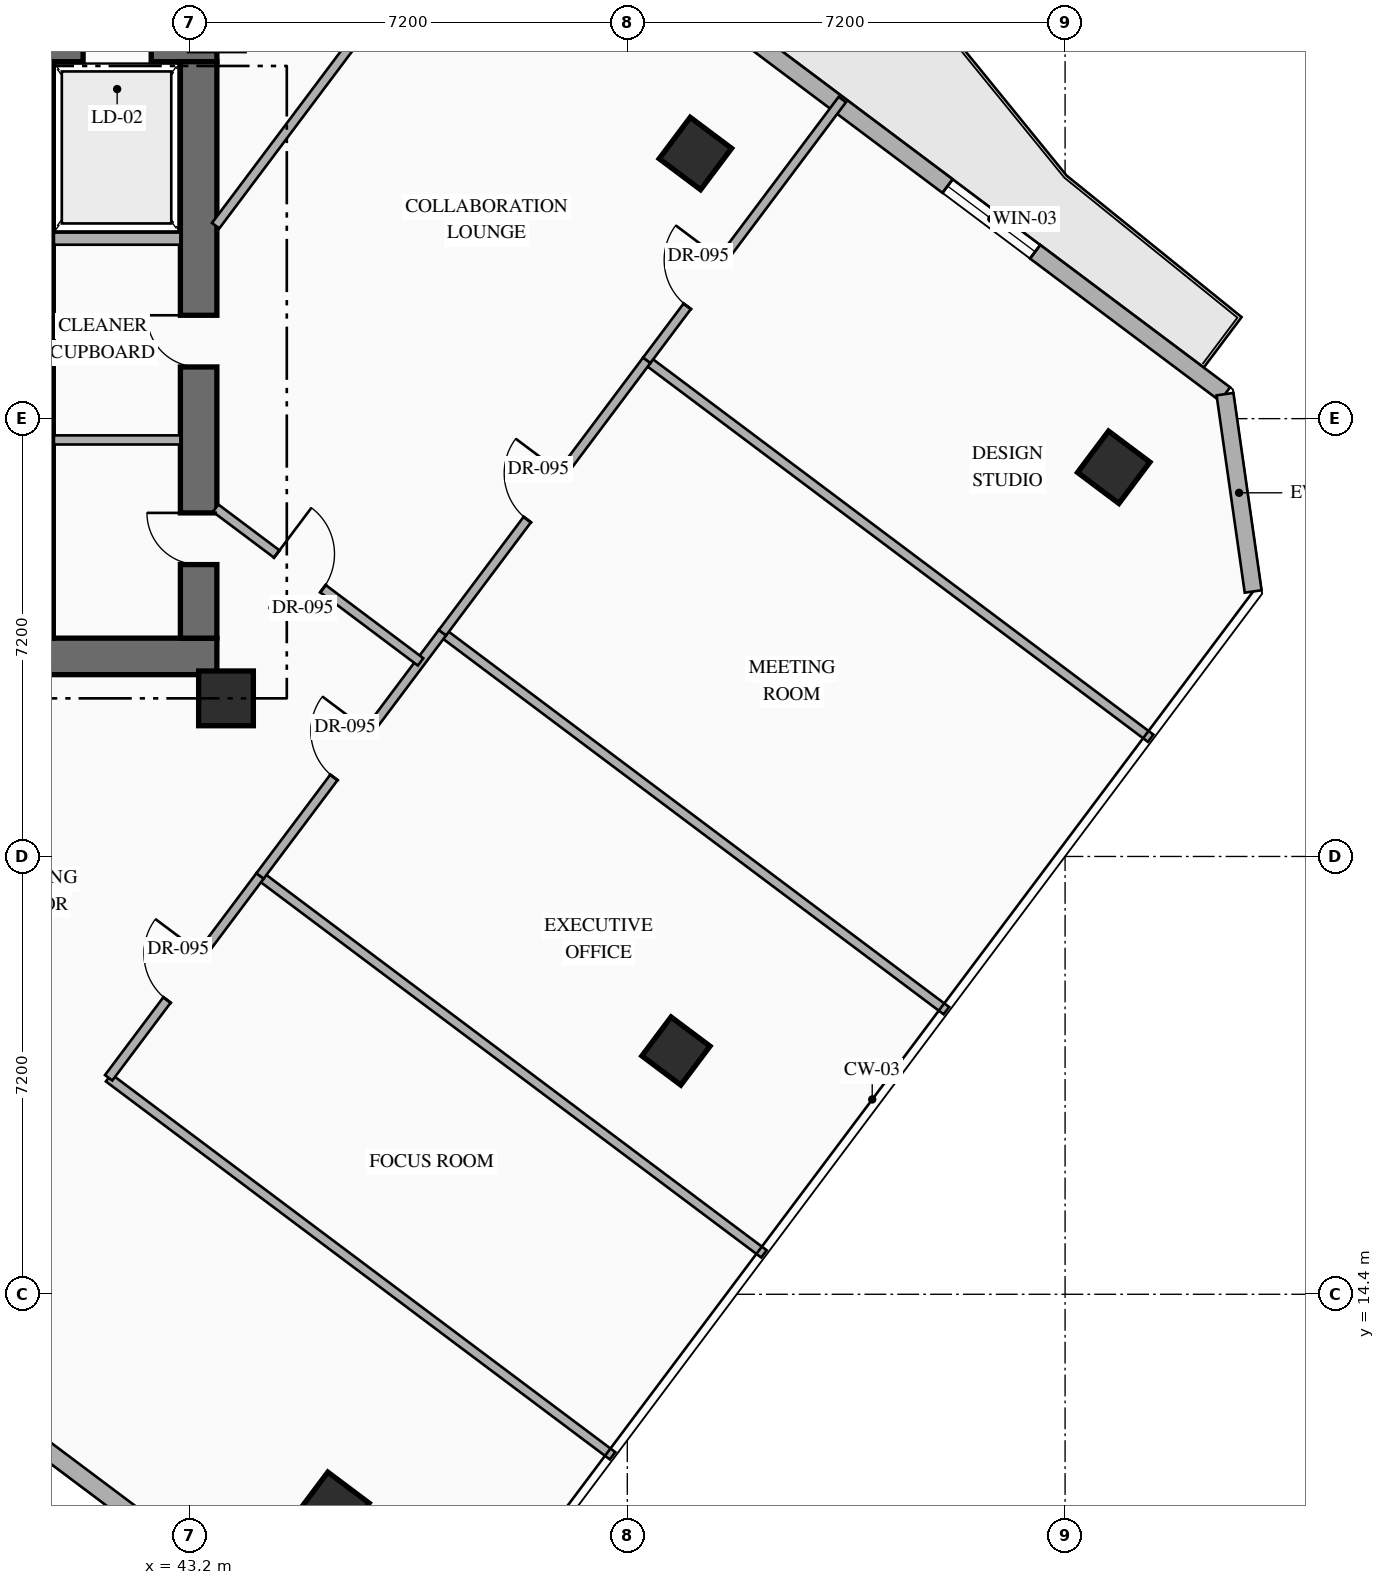
"""IFC4 building model, lengths in metres.
Left out: names, types, materials, properties, quantities, classifications, styles, units other than length and angle.
Written with IfcOpenShell. Run it as: python <this file> out.ifc"""

import sys

from ifc_helpers import new_model, si_unit, direction, frame, frame_2d, origin, origin_2d, place, context, subcontext, project, spatial, rectangle, hollow_rectangle, extrude, element, fill, save


model = new_model("IFC4")
c1 = context("Model", 3, precision=1e-05, world=origin(), true_north=direction((0.0, 1.0)))
c2 = subcontext(c1, "Body", "Model", "MODEL_VIEW")
j1 = project(units=[si_unit("LENGTHUNIT", "METRE"), si_unit("PLANEANGLEUNIT", "RADIAN")], contexts=[c1])
p1 = place(None, origin())
s1 = spatial("IfcSite", under=j1, at=p1, CompositionType="ELEMENT")
p2 = place(p1, origin())
s2 = spatial("IfcBuilding", under=s1, at=p2, CompositionType="ELEMENT")
p3 = place(p2, frame((0.0, 0.0, 145.65)))
s3 = spatial("IfcBuildingStorey", under=s2, at=p3, CompositionType="ELEMENT", Elevation=145.65)
p4 = place(p3, frame((35.89, 24.89, 0.0), z_axis=(0.0, 0.0, 1.0), x_axis=(1.0, 0.0, 0.0)))
e1 = element("IfcWall", 1, at=p4, inside=s3, PredefinedType="SHEAR", context=c2, shape_type="SweptSolid", body=[
    extrude(rectangle(XDim=7.76, YDim=0.6, at=frame_2d((3.88, 0.0))), origin(), (0.0, 0.0, 1.0), 3.6),
])
p5 = place(p3, frame((35.89, 34.97, 0.0), z_axis=(0.0, 0.0, 1.0), x_axis=(1.0, 0.0, 0.0)))
e2 = element("IfcWall", 2, at=p5, inside=s3, PredefinedType="SHEAR", context=c2, shape_type="SweptSolid", body=[
    extrude(rectangle(XDim=7.76, YDim=0.6, at=frame_2d((3.88, 0.0))), origin(), (0.0, 0.0, 1.0), 3.6),
])
p6 = place(p5, frame((2.66, 0.0, 0.0)))
e3 = element("IfcOpeningElement", 3, at=p6, cuts=e2, PredefinedType="OPENING", context=c2, shape_type="SweptSolid", body=[
    extrude(rectangle(XDim=1.1, YDim=2.2, at=frame_2d((0.55, 1.1))), frame((0.0, 0.31, 0.0), z_axis=(0.0, -1.0, 0.0), x_axis=(1.0, 0.0, 0.0)), (0.0, 0.0, 1.0), 0.62),
])
p7 = place(p5, frame((5.56, 0.0, 0.0)))
e4 = element("IfcOpeningElement", 4, at=p7, cuts=e2, PredefinedType="OPENING", context=c2, shape_type="SweptSolid", body=[
    extrude(rectangle(XDim=1.12, YDim=2.15, at=frame_2d((0.56, 1.075))), frame((0.0, 0.31, 0.0), z_axis=(0.0, -1.0, 0.0), x_axis=(1.0, 0.0, 0.0)), (0.0, 0.0, 1.0), 0.62),
])
p8 = place(p3, frame((43.35, 25.19, 0.0), z_axis=(0.0, 0.0, 1.0), x_axis=(0.0, 1.0, 0.0)))
e5 = element("IfcWall", 5, at=p8, inside=s3, PredefinedType="SHEAR", context=c2, shape_type="SweptSolid", body=[
    extrude(rectangle(XDim=9.48, YDim=0.6, at=frame_2d((4.74, 0.0))), origin(), (0.0, 0.0, 1.0), 3.6),
])
p9 = place(p8, frame((1.21, 0.0, 0.0)))
e6 = element("IfcOpeningElement", 6, at=p9, cuts=e5, PredefinedType="OPENING", context=c2, shape_type="SweptSolid", body=[
    extrude(rectangle(XDim=0.85, YDim=2.08, at=frame_2d((0.425, 1.04))), frame((0.0, 0.31, 0.0), z_axis=(0.0, -1.0, 0.0), x_axis=(1.0, 0.0, 0.0)), (0.0, 0.0, 1.0), 0.62),
])
p10 = place(p8, frame((4.46, 0.0, 0.0)))
e7 = element("IfcOpeningElement", 7, at=p10, cuts=e5, PredefinedType="OPENING", context=c2, shape_type="SweptSolid", body=[
    extrude(rectangle(XDim=0.85, YDim=2.08, at=frame_2d((0.425, 1.04))), frame((0.0, 0.31, 0.0), z_axis=(0.0, -1.0, 0.0), x_axis=(1.0, 0.0, 0.0)), (0.0, 0.0, 1.0), 0.62),
])
p11 = place(p3, frame((40.81, 25.19, 0.0), z_axis=(0.0, 0.0, 1.0), x_axis=(0.0, 1.0, 0.0)))
e8 = element("IfcWall", 8, at=p11, inside=s3, PredefinedType="SHEAR", context=c2, shape_type="SweptSolid", body=[
    extrude(rectangle(XDim=9.48, YDim=0.3, at=frame_2d((4.74, 0.0))), origin(), (0.0, 0.0, 1.0), 3.6),
])
p12 = place(p3, frame((43.8, 24.2, 0.0), z_axis=(0.0, 0.0, 1.0), x_axis=(1.0, 0.0, 0.0)))
e9 = element("IfcColumn", 9, at=p12, inside=s3, PredefinedType="COLUMN", context=c2, shape_type="SweptSolid", body=[
    extrude(rectangle(XDim=0.9, YDim=0.9, at=origin_2d()), origin(), (0.0, 0.0, 1.0), 3.6),
])
for number, where, z_axis, x_axis in (
    (10, (51.52, 33.16, 0.0), (0.0, 0.0, 1.0), (0.8, -0.6, 0.0)),
    (11, (45.56, 10.88, 0.0), (0.0, 0.0, 1.0), (0.8, -0.6, 0.0)),
    (12, (58.4, 28.0, 0.0), (0.0, 0.0, 1.0), (0.8, -0.6, 0.0)),
):
    element("IfcColumn", number, at=place(p3, frame(where, z_axis=z_axis, x_axis=x_axis)), inside=s3, PredefinedType="COLUMN", context=c2, shape_type="SweptSolid", body=[
        extrude(hollow_rectangle(XDim=0.85, YDim=0.85, WallThickness=0.032, at=origin_2d()), origin(), (0.0, 0.0, 1.0), 3.6),
    ])
p13 = place(p3, frame((51.2, 18.4, 0.0), z_axis=(0.0, 0.0, 1.0), x_axis=(0.799999996291, -0.600000004945, 0.0)))
e13 = element("IfcColumn", 13, at=p13, inside=s3, PredefinedType="COLUMN", context=c2, shape_type="SweptSolid", body=[
    extrude(hollow_rectangle(XDim=0.8, YDim=0.8, WallThickness=0.032, at=origin_2d()), origin(), (0.0, 0.0, 1.0), 3.6),
])
p14 = place(p3, frame((44.86, 40.73, 0.0), z_axis=(0.0, 0.0, 1.0), x_axis=(0.800007624502, -0.599989833863, 0.0)))
e14 = element("IfcWall", 14, at=p14, inside=s3, PredefinedType="STANDARD", context=c2, shape_type="SweptSolid", body=[
    extrude(rectangle(XDim=19.212, YDim=0.28, at=frame_2d((9.606, 0.0))), origin(), (0.0, 0.0, 1.0), 3.35),
])
p15 = place(p14, frame((1.755, 0.0, 0.0)))
e15 = element("IfcOpeningElement", 15, at=p15, cuts=e14, PredefinedType="OPENING", context=c2, shape_type="SweptSolid", body=[
    extrude(rectangle(XDim=1.1, YDim=2.2, at=frame_2d((0.55, 1.1))), frame((0.0, 0.15, 0.0), z_axis=(0.0, -1.0, 0.0), x_axis=(1.0, 0.0, 0.0)), (0.0, 0.0, 1.0), 0.3),
])
p16 = place(p14, frame((13.509, 0.0, 0.85)))
e16 = element("IfcOpeningElement", 16, at=p16, cuts=e14, PredefinedType="OPENING", context=c2, shape_type="SweptSolid", body=[
    extrude(rectangle(XDim=1.8, YDim=2.1, at=frame_2d((0.9, 1.05))), frame((0.0, 0.15, 0.0), z_axis=(0.0, -1.0, 0.0), x_axis=(1.0, 0.0, 0.0)), (0.0, 0.0, 1.0), 0.3),
])
p17 = place(p3, frame((60.23, 29.203, 0.0), z_axis=(0.0, 0.0, 1.0), x_axis=(0.141296221922, -0.989967361922, 0.0)))
e17 = element("IfcWall", 17, at=p17, inside=s3, PredefinedType="STANDARD", context=c2, shape_type="SweptSolid", body=[
    extrude(rectangle(XDim=3.278, YDim=0.28, at=frame_2d((1.639, 0.0))), origin(), (0.0, 0.0, 1.0), 3.35),
])
p18 = place(p3, frame((44.918, 8.787, 0.0), z_axis=(0.0, 0.0, 1.0), x_axis=(-0.800004765927, 0.599993645378, 0.0)))
e18 = element("IfcWall", 18, at=p18, inside=s3, PredefinedType="STANDARD", context=c2, shape_type="SweptSolid", body=[
    extrude(rectangle(XDim=24.588, YDim=0.28, at=frame_2d((12.294, 0.0))), origin(), (0.0, 0.0, 1.0), 3.35),
])
p19 = place(p3, frame((40.97, 31.76, 0.0), z_axis=(0.0, 0.0, 1.0), x_axis=(1.0, 0.0, 0.0)))
e19 = element("IfcWall", 19, at=p19, inside=s3, PredefinedType="STANDARD", context=c2, shape_type="SweptSolid", body=[
    extrude(rectangle(XDim=2.08, YDim=0.2, at=frame_2d((1.04, 0.0))), origin(), (0.0, 0.0, 1.0), 3.35),
])
p20 = place(p3, frame((40.97, 28.45, 0.0), z_axis=(0.0, 0.0, 1.0), x_axis=(1.0, 0.0, 0.0)))
e20 = element("IfcWall", 20, at=p20, inside=s3, PredefinedType="PARTITIONING", context=c2, shape_type="SweptSolid", body=[
    extrude(rectangle(XDim=2.08, YDim=0.15, at=frame_2d((1.04, 0.0))), origin(), (0.0, 0.0, 1.0), 3.35),
])
for number, where, z_axis, x_axis in (
    (21, (41.87, 17.96, 0.0), (0.0, 0.0, 1.0), (0.8, -0.6, 0.0)),
    (22, (44.36, 21.28, 0.0), (0.0, 0.0, 1.0), (0.8, -0.6, 0.0)),
):
    element("IfcWall", number, at=place(p3, frame(where, z_axis=z_axis, x_axis=x_axis)), inside=s3, PredefinedType="PARTITIONING", context=c2, shape_type="SweptSolid", body=[
        extrude(rectangle(XDim=10.36, YDim=0.15, at=frame_2d((5.18, 0.0))), origin(), (0.0, 0.0, 1.0), 3.35),
    ])
p21 = place(p3, frame((41.87, 17.96, 0.0), z_axis=(0.0, 0.0, 1.0), x_axis=(0.599990587419, 0.80000705935, 0.0)))
e23 = element("IfcWall", 23, at=p21, inside=s3, PredefinedType="PARTITIONING", context=c2, shape_type="SweptSolid", body=[
    extrude(rectangle(XDim=4.15, YDim=0.15, at=frame_2d((2.075, 0.0))), origin(), (0.0, 0.0, 1.0), 3.35),
])
p22 = place(p21, frame((1.6, 0.0, 0.0)))
e24 = element("IfcOpeningElement", 24, at=p22, cuts=e23, PredefinedType="OPENING", context=c2, shape_type="SweptSolid", body=[
    extrude(rectangle(XDim=0.95, YDim=2.15, at=frame_2d((0.475, 1.075))), frame((0.0, 0.085, 0.0), z_axis=(0.0, -1.0, 0.0), x_axis=(1.0, 0.0, 0.0)), (0.0, 0.0, 1.0), 0.17),
])
p23 = place(p3, frame((47.36, 25.28, 0.0), z_axis=(0.0, 0.0, 1.0), x_axis=(0.799991516197, -0.600011311571, 0.0)))
e25 = element("IfcWall", 25, at=p23, inside=s3, PredefinedType="PARTITIONING", context=c2, shape_type="SweptSolid", body=[
    extrude(rectangle(XDim=10.36, YDim=0.15, at=frame_2d((5.18, 0.0))), origin(), (0.0, 0.0, 1.0), 3.35),
])
p24 = place(p3, frame((44.36, 21.28, 0.0), z_axis=(0.0, 0.0, 1.0), x_axis=(0.6, 0.8, 0.0)))
e26 = element("IfcWall", 26, at=p24, inside=s3, PredefinedType="PARTITIONING", context=c2, shape_type="SweptSolid", body=[
    extrude(rectangle(XDim=5.0, YDim=0.15, at=frame_2d((2.5, 0.0))), origin(), (0.0, 0.0, 1.0), 3.35),
])
p25 = place(p24, frame((2.025, 0.0, 0.0)))
e27 = element("IfcOpeningElement", 27, at=p25, cuts=e26, PredefinedType="OPENING", context=c2, shape_type="SweptSolid", body=[
    extrude(rectangle(XDim=0.95, YDim=2.15, at=frame_2d((0.475, 1.075))), frame((0.0, 0.085, 0.0), z_axis=(0.0, -1.0, 0.0), x_axis=(1.0, 0.0, 0.0)), (0.0, 0.0, 1.0), 0.17),
])
p26 = place(p3, frame((50.72, 29.76, 0.0), z_axis=(0.0, 0.0, 1.0), x_axis=(0.8, -0.6, 0.0)))
e28 = element("IfcWall", 28, at=p26, inside=s3, PredefinedType="PARTITIONING", context=c2, shape_type="SweptSolid", body=[
    extrude(rectangle(XDim=10.36, YDim=0.15, at=frame_2d((5.18, 0.0))), origin(), (0.0, 0.0, 1.0), 3.35),
])
p27 = place(p3, frame((47.36, 25.28, 0.0), z_axis=(0.0, 0.0, 1.0), x_axis=(0.599986048773, 0.80001046323, 0.0)))
e29 = element("IfcWall", 29, at=p27, inside=s3, PredefinedType="PARTITIONING", context=c2, shape_type="SweptSolid", body=[
    extrude(rectangle(XDim=5.6, YDim=0.15, at=frame_2d((2.8, 0.0))), origin(), (0.0, 0.0, 1.0), 3.35),
])
p28 = place(p27, frame((2.325, 0.0, 0.0)))
e30 = element("IfcOpeningElement", 30, at=p28, cuts=e29, PredefinedType="OPENING", context=c2, shape_type="SweptSolid", body=[
    extrude(rectangle(XDim=0.95, YDim=2.15, at=frame_2d((0.475, 1.075))), frame((0.0, 0.085, 0.0), z_axis=(0.0, -1.0, 0.0), x_axis=(1.0, 0.0, 0.0)), (0.0, 0.0, 1.0), 0.17),
])
p29 = place(p3, frame((50.72, 29.76, 0.0), z_axis=(0.0, 0.0, 1.0), x_axis=(0.6, 0.8, 0.0)))
e31 = element("IfcWall", 31, at=p29, inside=s3, PredefinedType="PARTITIONING", context=c2, shape_type="SweptSolid", body=[
    extrude(rectangle(XDim=5.36, YDim=0.15, at=frame_2d((2.68, 0.0))), origin(), (0.0, 0.0, 1.0), 3.35),
])
p30 = place(p29, frame((1.11, 0.0, 0.0)))
e32 = element("IfcOpeningElement", 32, at=p30, cuts=e31, PredefinedType="OPENING", context=c2, shape_type="SweptSolid", body=[
    extrude(rectangle(XDim=0.95, YDim=2.15, at=frame_2d((0.475, 1.075))), frame((0.0, 0.085, 0.0), z_axis=(0.0, -1.0, 0.0), x_axis=(1.0, 0.0, 0.0)), (0.0, 0.0, 1.0), 0.17),
])
p31 = place(p3, frame((43.63, 27.328, 0.0), z_axis=(0.0, 0.0, 1.0), x_axis=(0.799972182084, -0.600037088764, 0.0)))
e33 = element("IfcWall", 33, at=p31, inside=s3, PredefinedType="PARTITIONING", context=c2, shape_type="SweptSolid", body=[
    extrude(rectangle(XDim=4.213, YDim=0.15, at=frame_2d((2.106, 0.0))), origin(), (0.0, 0.0, 1.0), 3.045),
])
p32 = place(p31, frame((1.256, 0.0, 0.0)))
e34 = element("IfcOpeningElement", 34, at=p32, cuts=e33, PredefinedType="OPENING", context=c2, shape_type="SweptSolid", body=[
    extrude(rectangle(XDim=0.95, YDim=2.15, at=frame_2d((0.475, 1.075))), frame((0.0, 0.085, 0.0), z_axis=(0.0, -1.0, 0.0), x_axis=(1.0, 0.0, 0.0)), (0.0, 0.0, 1.0), 0.17),
])
p33 = place(p3, frame((43.63, 31.973, 0.0), z_axis=(0.0, 0.0, 1.0), x_axis=(0.599975099311, 0.800018674911, 0.0)))
e35 = element("IfcWall", 35, at=p33, inside=s3, PredefinedType="PARTITIONING", context=c2, shape_type="SweptSolid", body=[
    extrude(rectangle(XDim=7.844, YDim=0.15, at=frame_2d((3.922, 0.0))), origin(), (0.0, 0.0, 1.0), 3.35),
])
p34 = place(p16, origin())
e36 = element("IfcWindow", 36, at=p34, inside=s3, PartitioningType="SINGLE_PANEL", PredefinedType="WINDOW", context=c2, shape_type="SweptSolid", body=[
    extrude(rectangle(XDim=1.8, YDim=2.1, at=frame_2d((0.9, 1.05))), frame((0.0, 0.03, 0.0), z_axis=(0.0, -1.0, 0.0), x_axis=(1.0, 0.0, 0.0)), (0.0, 0.0, 1.0), 0.06),
])
fill(e16, e36)
p35 = place(p9, origin())
e37 = element("IfcDoor", 37, at=p35, inside=s3, OperationType="SINGLE_SWING_RIGHT", PredefinedType="DOOR", context=c2, shape_type="SweptSolid", body=[
    extrude(rectangle(XDim=0.85, YDim=2.08, at=frame_2d((0.425, 1.04))), frame((0.0, 0.025, 0.0), z_axis=(0.0, -1.0, 0.0), x_axis=(1.0, 0.0, 0.0)), (0.0, 0.0, 1.0), 0.05),
])
fill(e6, e37)
p36 = place(p10, origin())
e38 = element("IfcDoor", 38, at=p36, inside=s3, OperationType="SINGLE_SWING_RIGHT", PredefinedType="DOOR", context=c2, shape_type="SweptSolid", body=[
    extrude(rectangle(XDim=0.85, YDim=2.08, at=frame_2d((0.425, 1.04))), frame((0.0, 0.025, 0.0), z_axis=(0.0, -1.0, 0.0), x_axis=(1.0, 0.0, 0.0)), (0.0, 0.0, 1.0), 0.05),
])
fill(e7, e38)
p37 = place(p22, origin())
e39 = element("IfcDoor", 39, at=p37, inside=s3, OperationType="SINGLE_SWING_RIGHT", PredefinedType="DOOR", context=c2, shape_type="SweptSolid", body=[
    extrude(rectangle(XDim=0.95, YDim=2.15, at=frame_2d((0.475, 1.075))), frame((0.0, 0.025, 0.0), z_axis=(0.0, -1.0, 0.0), x_axis=(1.0, 0.0, 0.0)), (0.0, 0.0, 1.0), 0.05),
])
fill(e24, e39)
p38 = place(p25, origin())
e40 = element("IfcDoor", 40, at=p38, inside=s3, OperationType="SINGLE_SWING_RIGHT", PredefinedType="DOOR", context=c2, shape_type="SweptSolid", body=[
    extrude(rectangle(XDim=0.95, YDim=2.15, at=frame_2d((0.475, 1.075))), frame((0.0, 0.025, 0.0), z_axis=(0.0, -1.0, 0.0), x_axis=(1.0, 0.0, 0.0)), (0.0, 0.0, 1.0), 0.05),
])
fill(e27, e40)
p39 = place(p28, origin())
e41 = element("IfcDoor", 41, at=p39, inside=s3, OperationType="SINGLE_SWING_RIGHT", PredefinedType="DOOR", context=c2, shape_type="SweptSolid", body=[
    extrude(rectangle(XDim=0.95, YDim=2.15, at=frame_2d((0.475, 1.075))), frame((0.0, 0.025, 0.0), z_axis=(0.0, -1.0, 0.0), x_axis=(1.0, 0.0, 0.0)), (0.0, 0.0, 1.0), 0.05),
])
fill(e30, e41)
p40 = place(p30, origin())
e42 = element("IfcDoor", 42, at=p40, inside=s3, OperationType="SINGLE_SWING_RIGHT", PredefinedType="DOOR", context=c2, shape_type="SweptSolid", body=[
    extrude(rectangle(XDim=0.95, YDim=2.15, at=frame_2d((0.475, 1.075))), frame((0.0, 0.025, 0.0), z_axis=(0.0, -1.0, 0.0), x_axis=(1.0, 0.0, 0.0)), (0.0, 0.0, 1.0), 0.05),
])
fill(e32, e42)
p41 = place(p32, origin())
e43 = element("IfcDoor", 43, at=p41, inside=s3, OperationType="SINGLE_SWING_LEFT", PredefinedType="DOOR", context=c2, shape_type="SweptSolid", body=[
    extrude(rectangle(XDim=0.95, YDim=2.15, at=frame_2d((0.475, 1.075))), frame((0.0, 0.025, 0.0), z_axis=(0.0, -1.0, 0.0), x_axis=(1.0, 0.0, 0.0)), (0.0, 0.0, 1.0), 0.05),
])
fill(e34, e43)
save(model, sys.argv[1])
